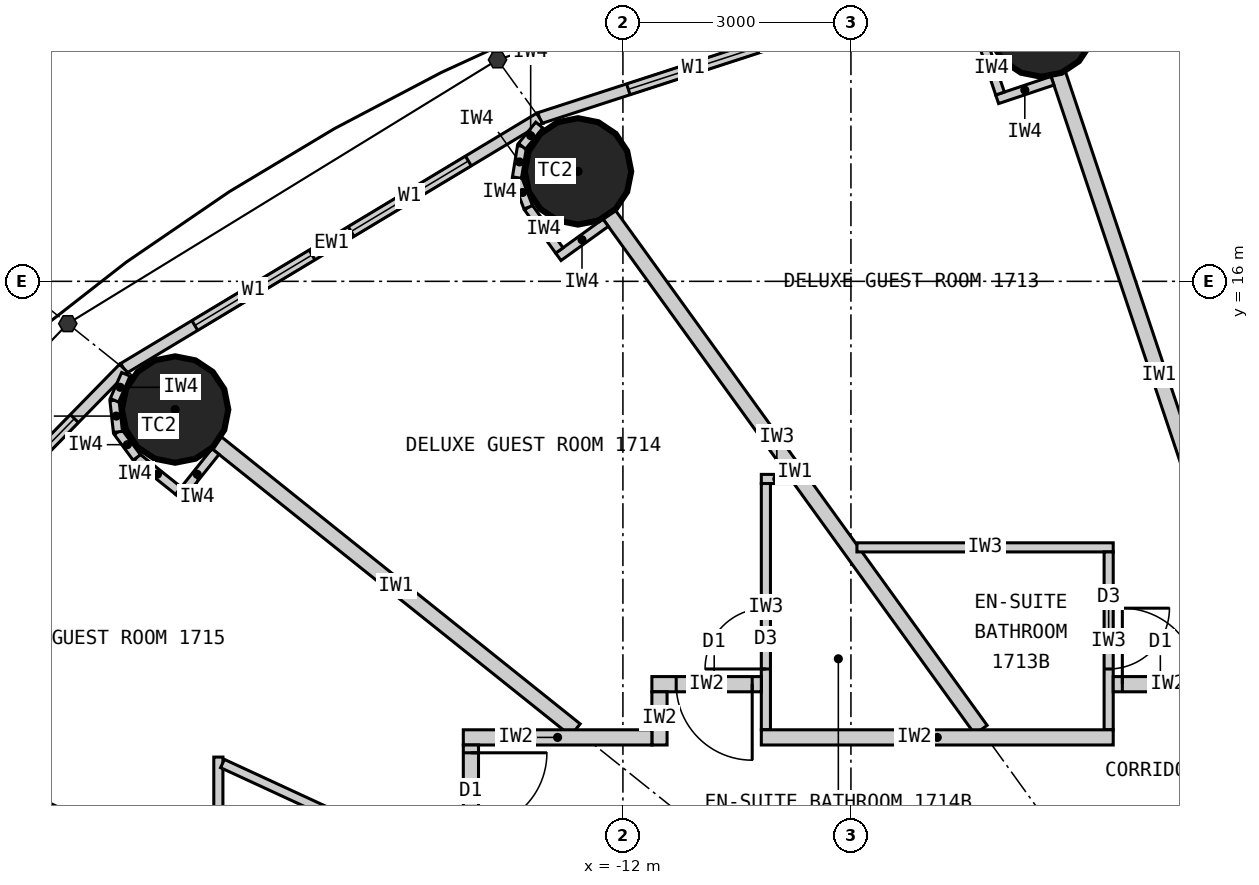
"""IFC4 building model, lengths in metres.
Left out: names, types, materials, properties, quantities, classifications, styles, units other than length and angle.
Written with IfcOpenShell. Run it as: python <this file> out.ifc"""

import sys

from ifc_helpers import new_model, si_unit, direction, frame, frame_2d, origin, origin_2d, place, context, subcontext, project, spatial, rectangle, circle, extrude, element, fill, save


model = new_model("IFC4")
c1 = context("Model", 3, precision=1e-05, world=origin(), true_north=direction((0.0, 1.0)))
c2 = subcontext(c1, "Body", "Model", "MODEL_VIEW")
j1 = project(units=[si_unit("LENGTHUNIT", "METRE"), si_unit("PLANEANGLEUNIT", "RADIAN")], contexts=[c1])
p1 = place(None, origin())
s1 = spatial("IfcSite", under=j1, at=p1, CompositionType="ELEMENT")
p2 = place(p1, origin())
s2 = spatial("IfcBuilding", under=s1, at=p2, CompositionType="ELEMENT")
p3 = place(p2, frame((0.0, 0.0, 70.5)))
s3 = spatial("IfcBuildingStorey", under=s2, at=p3, CompositionType="ELEMENT", Elevation=70.5)
for number, where, z_axis, x_axis in (
    (1, (-6.495, 19.391, 0.0), (0.0, 0.0, 1.0), (1.0, 0.0, 0.0)),
    (2, (-12.591, 17.447, 0.0), (0.0, 0.0, 1.0), (1.0, 0.0, 0.0)),
    (3, (-17.892, 14.313, 0.0), (0.0, 0.0, 1.0), (1.0, 0.0, 0.0)),
):
    element("IfcColumn", number, at=place(p3, frame(where, z_axis=z_axis, x_axis=x_axis)), inside=s3, PredefinedType="COLUMN", context=c2, shape_type="SweptSolid", body=[
        extrude(circle(Radius=0.7, at=origin_2d()), origin(), (0.0, 0.0, 1.0), 3.3),
    ])
p4 = place(p3, frame((-6.766, 20.202, 0.0), z_axis=(0.0, 0.0, 1.0), x_axis=(-0.951137534625, -0.308767534285, 0.0)))
e4 = element("IfcWall", 4, at=p4, inside=s3, PredefinedType="ELEMENTEDWALL", context=c2, shape_type="SweptSolid", body=[
    extrude(rectangle(XDim=6.655, YDim=0.15, at=frame_2d((3.328, 0.0))), origin(), (0.0, 0.0, 1.0), 3.12),
])
p5 = place(p4, frame((1.228, 0.0, 0.9)))
e5 = element("IfcOpeningElement", 5, at=p5, cuts=e4, PredefinedType="OPENING", context=c2, shape_type="SweptSolid", body=[
    extrude(rectangle(XDim=1.8, YDim=1.9, at=frame_2d((0.9, 0.95))), frame((0.0, 0.085, 0.0), z_axis=(0.0, -1.0, 0.0), x_axis=(1.0, 0.0, 0.0)), (0.0, 0.0, 1.0), 0.17),
])
p6 = place(p4, frame((3.628, 0.0, 0.9)))
e6 = element("IfcOpeningElement", 6, at=p6, cuts=e4, PredefinedType="OPENING", context=c2, shape_type="SweptSolid", body=[
    extrude(rectangle(XDim=1.8, YDim=1.9, at=frame_2d((0.9, 0.95))), frame((0.0, 0.085, 0.0), z_axis=(0.0, -1.0, 0.0), x_axis=(1.0, 0.0, 0.0)), (0.0, 0.0, 1.0), 0.17),
])
p7 = place(p3, frame((-13.096, 18.147, 0.0), z_axis=(0.0, 0.0, 1.0), x_axis=(-0.856983180864, -0.515344377787, 0.0)))
e7 = element("IfcWall", 7, at=p7, inside=s3, PredefinedType="ELEMENTEDWALL", context=c2, shape_type="SweptSolid", body=[
    extrude(rectangle(XDim=6.386, YDim=0.15, at=frame_2d((3.193, 0.0))), origin(), (0.0, 0.0, 1.0), 3.12),
])
p8 = place(p7, frame((1.093, 0.0, 0.9)))
e8 = element("IfcOpeningElement", 8, at=p8, cuts=e7, PredefinedType="OPENING", context=c2, shape_type="SweptSolid", body=[
    extrude(rectangle(XDim=1.8, YDim=1.9, at=frame_2d((0.9, 0.95))), frame((0.0, 0.085, 0.0), z_axis=(0.0, -1.0, 0.0), x_axis=(1.0, 0.0, 0.0)), (0.0, 0.0, 1.0), 0.17),
])
p9 = place(p7, frame((3.493, 0.0, 0.9)))
e9 = element("IfcOpeningElement", 9, at=p9, cuts=e7, PredefinedType="OPENING", context=c2, shape_type="SweptSolid", body=[
    extrude(rectangle(XDim=1.8, YDim=1.9, at=frame_2d((0.9, 0.95))), frame((0.0, 0.085, 0.0), z_axis=(0.0, -1.0, 0.0), x_axis=(1.0, 0.0, 0.0)), (0.0, 0.0, 1.0), 0.17),
])
p10 = place(p3, frame((-18.57, 14.856, 0.0), z_axis=(0.0, 0.0, 1.0), x_axis=(-0.699602905915, -0.714531856557, 0.0)))
e10 = element("IfcWall", 10, at=p10, inside=s3, PredefinedType="ELEMENTEDWALL", context=c2, shape_type="SweptSolid", body=[
    extrude(rectangle(XDim=6.051, YDim=0.15, at=frame_2d((3.025, 0.0))), origin(), (0.0, 0.0, 1.0), 3.12),
])
p11 = place(p10, frame((0.926, 0.0, 0.9)))
e11 = element("IfcOpeningElement", 11, at=p11, cuts=e10, PredefinedType="OPENING", context=c2, shape_type="SweptSolid", body=[
    extrude(rectangle(XDim=1.8, YDim=1.9, at=frame_2d((0.9, 0.95))), frame((0.0, 0.085, 0.0), z_axis=(0.0, -1.0, 0.0), x_axis=(1.0, 0.0, 0.0)), (0.0, 0.0, 1.0), 0.17),
])
p12 = place(p10, frame((3.325, 0.0, 0.9)))
e12 = element("IfcOpeningElement", 12, at=p12, cuts=e10, PredefinedType="OPENING", context=c2, shape_type="SweptSolid", body=[
    extrude(rectangle(XDim=1.8, YDim=1.9, at=frame_2d((0.9, 0.95))), frame((0.0, 0.085, 0.0), z_axis=(0.0, -1.0, 0.0), x_axis=(1.0, 0.0, 0.0)), (0.0, 0.0, 1.0), 0.17),
])
p13 = place(p3, frame((-3.617, 10.8, 0.0), z_axis=(0.0, 0.0, 1.0), x_axis=(-0.317576599239, 0.948232621046, 0.0)))
e13 = element("IfcWall", 13, at=p13, inside=s3, PredefinedType="PARTITIONING", context=c2, shape_type="SweptSolid", body=[
    extrude(rectangle(XDim=8.36, YDim=0.2, at=frame_2d((4.18, 0.0))), origin(), (0.0, 0.0, 1.0), 2.32),
])
p14 = place(p3, frame((-7.289, 10.1, 0.0), z_axis=(0.0, 0.0, 1.0), x_axis=(-0.585198353053, 0.810890182197, 0.0)))
e14 = element("IfcWall", 14, at=p14, inside=s3, PredefinedType="PARTITIONING", context=c2, shape_type="SweptSolid", body=[
    extrude(rectangle(XDim=8.36, YDim=0.2, at=frame_2d((4.18, 0.0))), origin(), (0.0, 0.0, 1.0), 2.32),
])
p15 = place(p3, frame((-12.625, 10.1, 0.0), z_axis=(0.0, 0.0, 1.0), x_axis=(-0.780892451574, 0.624665493744, 0.0)))
e15 = element("IfcWall", 15, at=p15, inside=s3, PredefinedType="PARTITIONING", context=c2, shape_type="SweptSolid", body=[
    extrude(rectangle(XDim=6.045, YDim=0.2, at=frame_2d((3.022, 0.0))), origin(), (0.0, 0.0, 1.0), 2.32),
])
p16 = place(p3, frame((-14.1, 6.512, 0.0), z_axis=(0.0, 0.0, 1.0), x_axis=(-0.907832871056, 0.419332181247, 0.0)))
e16 = element("IfcWall", 16, at=p16, inside=s3, PredefinedType="PARTITIONING", context=c2, shape_type="SweptSolid", body=[
    extrude(rectangle(XDim=8.023, YDim=0.2, at=frame_2d((4.011, 0.0))), origin(), (0.0, 0.0, 1.0), 2.32),
])
p17 = place(p3, frame((-8.921, 12.5, 0.0), z_axis=(0.0, 0.0, 1.0), x_axis=(1.0, 0.0, 0.0)))
e17 = element("IfcWall", 17, at=p17, inside=s3, PredefinedType="PARTITIONING", context=c2, shape_type="SweptSolid", body=[
    extrude(rectangle(XDim=3.372, YDim=0.12, at=frame_2d((1.686, 0.0))), origin(), (0.0, 0.0, 1.0), 3.12),
])
p18 = place(p3, frame((-5.609, 10.1, 0.0), z_axis=(0.0, 0.0, 1.0), x_axis=(0.0, 1.0, 0.0)))
e18 = element("IfcWall", 18, at=p18, inside=s3, PredefinedType="PARTITIONING", context=c2, shape_type="SweptSolid", body=[
    extrude(rectangle(XDim=2.34, YDim=0.12, at=frame_2d((1.17, 0.0))), origin(), (0.0, 0.0, 1.0), 3.12),
])
p19 = place(p18, frame((0.8, 0.0, 0.0)))
e19 = element("IfcOpeningElement", 19, at=p19, cuts=e18, PredefinedType="OPENING", context=c2, shape_type="SweptSolid", body=[
    extrude(rectangle(XDim=0.8, YDim=2.1, at=frame_2d((0.4, 1.05))), frame((0.0, 0.07, 0.0), z_axis=(0.0, -1.0, 0.0), x_axis=(1.0, 0.0, 0.0)), (0.0, 0.0, 1.0), 0.14),
])
p20 = place(p3, frame((-9.771, 13.4, 0.0), z_axis=(0.0, 0.0, 1.0), x_axis=(-1.0, 0.0, 0.0)))
e20 = element("IfcWall", 20, at=p20, inside=s3, PredefinedType="PARTITIONING", context=c2, shape_type="SweptSolid", body=[
    extrude(rectangle(XDim=0.408, YDim=0.12, at=frame_2d((0.204, 0.0))), origin(), (0.0, 0.0, 1.0), 3.12),
])
p21 = place(p3, frame((-10.119, 10.1, 0.0), z_axis=(0.0, 0.0, 1.0), x_axis=(0.0, 1.0, 0.0)))
e21 = element("IfcWall", 21, at=p21, inside=s3, PredefinedType="PARTITIONING", context=c2, shape_type="SweptSolid", body=[
    extrude(rectangle(XDim=3.24, YDim=0.12, at=frame_2d((1.62, 0.0))), origin(), (0.0, 0.0, 1.0), 3.12),
])
p22 = place(p21, frame((0.8, 0.0, 0.0)))
e22 = element("IfcOpeningElement", 22, at=p22, cuts=e21, PredefinedType="OPENING", context=c2, shape_type="SweptSolid", body=[
    extrude(rectangle(XDim=0.8, YDim=2.1, at=frame_2d((0.4, 1.05))), frame((0.0, 0.07, 0.0), z_axis=(0.0, -1.0, 0.0), x_axis=(1.0, 0.0, 0.0)), (0.0, 0.0, 1.0), 0.14),
])
p23 = place(p3, frame((-17.323, 8.101, 0.0), z_axis=(0.0, 0.0, 1.0), x_axis=(0.0, 1.0, 0.0)))
e23 = element("IfcWall", 23, at=p23, inside=s3, PredefinedType="PARTITIONING", context=c2, shape_type="SweptSolid", body=[
    extrude(rectangle(XDim=1.64, YDim=0.12, at=frame_2d((0.82, 0.0))), origin(), (0.0, 0.0, 1.0), 3.12),
])
p24 = place(p3, frame((-14.1, 8.193, 0.0), z_axis=(0.0, 0.0, 1.0), x_axis=(-0.907836493557, 0.419324338628, 0.0)))
e24 = element("IfcWall", 24, at=p24, inside=s3, PredefinedType="PARTITIONING", context=c2, shape_type="SweptSolid", body=[
    extrude(rectangle(XDim=3.49, YDim=0.12, at=frame_2d((1.745, 0.0))), origin(), (0.0, 0.0, 1.0), 3.12),
])
p25 = place(p24, frame((0.75, 0.0, 0.0)))
e25 = element("IfcOpeningElement", 25, at=p25, cuts=e24, PredefinedType="OPENING", context=c2, shape_type="SweptSolid", body=[
    extrude(rectangle(XDim=0.8, YDim=2.1, at=frame_2d((0.4, 1.05))), frame((0.0, 0.07, 0.0), z_axis=(0.0, -1.0, 0.0), x_axis=(1.0, 0.0, 0.0)), (0.0, 0.0, 1.0), 0.14),
])
p26 = place(p3, frame((-5.549, 10.7, 0.0), z_axis=(0.0, 0.0, 1.0), x_axis=(1.0, 0.0, 0.0)))
e26 = element("IfcWall", 26, at=p26, inside=s3, PredefinedType="PARTITIONING", context=c2, shape_type="SweptSolid", body=[
    extrude(rectangle(XDim=1.44, YDim=0.2, at=frame_2d((0.72, 0.0))), origin(), (0.0, 0.0, 1.0), 3.12),
])
p27 = place(p26, frame((0.12, 0.0, 0.0)))
e27 = element("IfcOpeningElement", 27, at=p27, cuts=e26, PredefinedType="OPENING", context=c2, shape_type="SweptSolid", body=[
    extrude(rectangle(XDim=1.0, YDim=2.2, at=frame_2d((0.5, 1.1))), frame((0.0, 0.11, 0.0), z_axis=(0.0, -1.0, 0.0), x_axis=(1.0, 0.0, 0.0)), (0.0, 0.0, 1.0), 0.22),
])
p28 = place(p3, frame((-11.619, 10.7, 0.0), z_axis=(0.0, 0.0, 1.0), x_axis=(1.0, 0.0, 0.0)))
e28 = element("IfcWall", 28, at=p28, inside=s3, PredefinedType="PARTITIONING", context=c2, shape_type="SweptSolid", body=[
    extrude(rectangle(XDim=1.44, YDim=0.2, at=frame_2d((0.72, 0.0))), origin(), (0.0, 0.0, 1.0), 3.12),
])
p29 = place(p28, frame((0.32, 0.0, 0.0)))
e29 = element("IfcOpeningElement", 29, at=p29, cuts=e28, PredefinedType="OPENING", context=c2, shape_type="SweptSolid", body=[
    extrude(rectangle(XDim=1.0, YDim=2.2, at=frame_2d((0.5, 1.1))), frame((0.0, 0.11, 0.0), z_axis=(0.0, -1.0, 0.0), x_axis=(1.0, 0.0, 0.0)), (0.0, 0.0, 1.0), 0.22),
])
p30 = place(p3, frame((-11.519, 9.9, 0.0), z_axis=(0.0, 0.0, 1.0), x_axis=(0.0, 1.0, 0.0)))
e30 = element("IfcWall", 30, at=p30, inside=s3, PredefinedType="PARTITIONING", context=c2, shape_type="SweptSolid", body=[
    extrude(rectangle(XDim=0.7, YDim=0.2, at=frame_2d((0.35, 0.0))), origin(), (0.0, 0.0, 1.0), 3.12),
])
p31 = place(p3, frame((-14.1, 10.0, 0.0), z_axis=(0.0, 0.0, 1.0), x_axis=(1.0, 0.0, 0.0)))
e31 = element("IfcWall", 31, at=p31, inside=s3, PredefinedType="PARTITIONING", context=c2, shape_type="SweptSolid", body=[
    extrude(rectangle(XDim=2.481, YDim=0.2, at=frame_2d((1.24, 0.0))), origin(), (0.0, 0.0, 1.0), 3.12),
])
p32 = place(p3, frame((-10.179, 10.0, 0.0), z_axis=(0.0, 0.0, 1.0), x_axis=(1.0, 0.0, 0.0)))
e32 = element("IfcWall", 32, at=p32, inside=s3, PredefinedType="PARTITIONING", context=c2, shape_type="SweptSolid", body=[
    extrude(rectangle(XDim=4.63, YDim=0.2, at=frame_2d((2.315, 0.0))), origin(), (0.0, 0.0, 1.0), 3.12),
])
p33 = place(p3, frame((-14.0, 9.9, 0.0), z_axis=(0.0, 0.0, 1.0), x_axis=(0.0, -1.0, 0.0)))
e33 = element("IfcWall", 33, at=p33, inside=s3, PredefinedType="PARTITIONING", context=c2, shape_type="SweptSolid", body=[
    extrude(rectangle(XDim=5.127, YDim=0.2, at=frame_2d((2.564, 0.0))), origin(), (0.0, 0.0, 1.0), 3.12),
])
p34 = place(p33, frame((0.103, 0.0, 0.0)))
e34 = element("IfcOpeningElement", 34, at=p34, cuts=e33, PredefinedType="OPENING", context=c2, shape_type="SweptSolid", body=[
    extrude(rectangle(XDim=1.0, YDim=2.2, at=frame_2d((0.5, 1.1))), frame((0.0, 0.11, 0.0), z_axis=(0.0, -1.0, 0.0), x_axis=(1.0, 0.0, 0.0)), (0.0, 0.0, 1.0), 0.22),
])
p35 = place(p3, frame((-6.348, 18.639, 0.0), z_axis=(0.0, 0.0, 1.0), x_axis=(-0.948268951266, -0.317468102437, 0.0)))
e35 = element("IfcWall", 35, at=p35, inside=s3, PredefinedType="PARTITIONING", context=c2, shape_type="SweptSolid", body=[
    extrude(rectangle(XDim=0.768, YDim=0.12, at=frame_2d((0.384, 0.0))), origin(), (0.0, 0.0, 1.0), 3.12),
])
p36 = place(p3, frame((-7.038, 18.471, 0.0), z_axis=(0.0, 0.0, 1.0), x_axis=(-0.317378466199, 0.9482989556, 0.0)))
e36 = element("IfcWall", 36, at=p36, inside=s3, PredefinedType="PARTITIONING", context=c2, shape_type="SweptSolid", body=[
    extrude(rectangle(XDim=0.7, YDim=0.12, at=frame_2d((0.35, 0.0))), origin(), (0.0, 0.0, 1.0), 3.12),
])
p37 = place(p3, frame((-12.227, 16.772, 0.0), z_axis=(0.0, 0.0, 1.0), x_axis=(-0.810821798253, -0.585293098778, 0.0)))
e37 = element("IfcWall", 37, at=p37, inside=s3, PredefinedType="PARTITIONING", context=c2, shape_type="SweptSolid", body=[
    extrude(rectangle(XDim=0.768, YDim=0.12, at=frame_2d((0.384, 0.0))), origin(), (0.0, 0.0, 1.0), 3.12),
])
p38 = place(p3, frame((-12.836, 16.406, 0.0), z_axis=(0.0, 0.0, 1.0), x_axis=(-0.585223113993, 0.810872312296, 0.0)))
e38 = element("IfcWall", 38, at=p38, inside=s3, PredefinedType="PARTITIONING", context=c2, shape_type="SweptSolid", body=[
    extrude(rectangle(XDim=0.7, YDim=0.12, at=frame_2d((0.35, 0.0))), origin(), (0.0, 0.0, 1.0), 3.12),
])
p39 = place(p3, frame((-13.246, 16.974, 0.0), z_axis=(0.0, 0.0, 1.0), x_axis=(-0.355728122235, 0.934589483705, 0.0)))
e39 = element("IfcWall", 39, at=p39, inside=s3, PredefinedType="PARTITIONING", context=c2, shape_type="SweptSolid", body=[
    extrude(rectangle(XDim=0.418, YDim=0.12, at=frame_2d((0.209, 0.0))), origin(), (0.0, 0.0, 1.0), 3.12),
])
p40 = place(p3, frame((-13.394, 17.365, 0.0), z_axis=(0.0, 0.0, 1.0), x_axis=(0.159379276926, 0.987217425943, 0.0)))
e40 = element("IfcWall", 40, at=p40, inside=s3, PredefinedType="PARTITIONING", context=c2, shape_type="SweptSolid", body=[
    extrude(rectangle(XDim=0.418, YDim=0.12, at=frame_2d((0.209, 0.0))), origin(), (0.0, 0.0, 1.0), 3.12),
])
p41 = place(p3, frame((-13.328, 17.777, 0.0), z_axis=(0.0, 0.0, 1.0), x_axis=(0.632276783541, 0.774742582407, 0.0)))
e41 = element("IfcWall", 41, at=p41, inside=s3, PredefinedType="PARTITIONING", context=c2, shape_type="SweptSolid", body=[
    extrude(rectangle(XDim=0.36, YDim=0.12, at=frame_2d((0.18, 0.0))), origin(), (0.0, 0.0, 1.0), 3.12),
])
p42 = place(p3, frame((-17.361, 13.76, 0.0), z_axis=(0.0, 0.0, 1.0), x_axis=(-0.624501042889, -0.781023973659, 0.0)))
e42 = element("IfcWall", 42, at=p42, inside=s3, PredefinedType="PARTITIONING", context=c2, shape_type="SweptSolid", body=[
    extrude(rectangle(XDim=0.767, YDim=0.12, at=frame_2d((0.384, 0.0))), origin(), (0.0, 0.0, 1.0), 3.12),
])
p43 = place(p3, frame((-17.85, 13.246, 0.0), z_axis=(0.0, 0.0, 1.0), x_axis=(-0.780902834923, 0.62465251333, 0.0)))
e43 = element("IfcWall", 43, at=p43, inside=s3, PredefinedType="PARTITIONING", context=c2, shape_type="SweptSolid", body=[
    extrude(rectangle(XDim=0.7, YDim=0.12, at=frame_2d((0.35, 0.0))), origin(), (0.0, 0.0, 1.0), 3.12),
])
for number, where, z_axis, x_axis in (
    (44, (-18.396, 13.683, 0.0), (0.0, 0.0, 1.0), (-0.592, 0.806, 0.0)),
    (45, (-18.644, 14.02, 0.0), (0.0, 0.0, 1.0), (-0.11, 0.994, 0.0)),
):
    element("IfcWall", number, at=place(p3, frame(where, z_axis=z_axis, x_axis=x_axis)), inside=s3, PredefinedType="PARTITIONING", context=c2, shape_type="SweptSolid", body=[
        extrude(rectangle(XDim=0.418, YDim=0.12, at=frame_2d((0.209, 0.0))), origin(), (0.0, 0.0, 1.0), 3.12),
    ])
p44 = place(p3, frame((-18.69, 14.435, 0.0), z_axis=(0.0, 0.0, 1.0), x_axis=(0.401093412634, 0.91603715773, 0.0)))
e46 = element("IfcWall", 46, at=p44, inside=s3, PredefinedType="PARTITIONING", context=c2, shape_type="SweptSolid", body=[
    extrude(rectangle(XDim=0.373, YDim=0.12, at=frame_2d((0.187, 0.0))), origin(), (0.0, 0.0, 1.0), 3.12),
])
p45 = place(p6, origin())
e47 = element("IfcWindow", 47, at=p45, inside=s3, PartitioningType="SINGLE_PANEL", PredefinedType="WINDOW", context=c2, shape_type="SweptSolid", body=[
    extrude(rectangle(XDim=1.8, YDim=1.9, at=frame_2d((0.9, 0.95))), frame((0.0, 0.03, 0.0), z_axis=(0.0, -1.0, 0.0), x_axis=(1.0, 0.0, 0.0)), (0.0, 0.0, 1.0), 0.06),
])
fill(e6, e47)
p46 = place(p8, origin())
e48 = element("IfcWindow", 48, at=p46, inside=s3, PartitioningType="SINGLE_PANEL", PredefinedType="WINDOW", context=c2, shape_type="SweptSolid", body=[
    extrude(rectangle(XDim=1.8, YDim=1.9, at=frame_2d((0.9, 0.95))), frame((0.0, 0.03, 0.0), z_axis=(0.0, -1.0, 0.0), x_axis=(1.0, 0.0, 0.0)), (0.0, 0.0, 1.0), 0.06),
])
fill(e8, e48)
p47 = place(p9, origin())
e49 = element("IfcWindow", 49, at=p47, inside=s3, PartitioningType="SINGLE_PANEL", PredefinedType="WINDOW", context=c2, shape_type="SweptSolid", body=[
    extrude(rectangle(XDim=1.8, YDim=1.9, at=frame_2d((0.9, 0.95))), frame((0.0, 0.03, 0.0), z_axis=(0.0, -1.0, 0.0), x_axis=(1.0, 0.0, 0.0)), (0.0, 0.0, 1.0), 0.06),
])
fill(e9, e49)
p48 = place(p11, origin())
e50 = element("IfcWindow", 50, at=p48, inside=s3, PartitioningType="SINGLE_PANEL", PredefinedType="WINDOW", context=c2, shape_type="SweptSolid", body=[
    extrude(rectangle(XDim=1.8, YDim=1.9, at=frame_2d((0.9, 0.95))), frame((0.0, 0.03, 0.0), z_axis=(0.0, -1.0, 0.0), x_axis=(1.0, 0.0, 0.0)), (0.0, 0.0, 1.0), 0.06),
])
fill(e11, e50)
p49 = place(p19, origin())
e51 = element("IfcDoor", 51, at=p49, inside=s3, OperationType="SINGLE_SWING_RIGHT", PredefinedType="DOOR", context=c2, shape_type="SweptSolid", body=[
    extrude(rectangle(XDim=0.8, YDim=2.1, at=frame_2d((0.4, 1.05))), frame((0.0, 0.025, 0.0), z_axis=(0.0, -1.0, 0.0), x_axis=(1.0, 0.0, 0.0)), (0.0, 0.0, 1.0), 0.05),
])
fill(e19, e51)
p50 = place(p27, origin())
e52 = element("IfcDoor", 52, at=p50, inside=s3, OperationType="SINGLE_SWING_LEFT", PredefinedType="DOOR", context=c2, shape_type="SweptSolid", body=[
    extrude(rectangle(XDim=1.0, YDim=2.2, at=frame_2d((0.5, 1.1))), frame((0.0, 0.025, 0.0), z_axis=(0.0, -1.0, 0.0), x_axis=(1.0, 0.0, 0.0)), (0.0, 0.0, 1.0), 0.05),
])
fill(e27, e52)
p51 = place(p22, origin())
e53 = element("IfcDoor", 53, at=p51, inside=s3, OperationType="SINGLE_SWING_LEFT", PredefinedType="DOOR", context=c2, shape_type="SweptSolid", body=[
    extrude(rectangle(XDim=0.8, YDim=2.1, at=frame_2d((0.4, 1.05))), frame((0.0, 0.025, 0.0), z_axis=(0.0, -1.0, 0.0), x_axis=(1.0, 0.0, 0.0)), (0.0, 0.0, 1.0), 0.05),
])
fill(e22, e53)
p52 = place(p29, origin())
e54 = element("IfcDoor", 54, at=p52, inside=s3, OperationType="SINGLE_SWING_RIGHT", PredefinedType="DOOR", context=c2, shape_type="SweptSolid", body=[
    extrude(rectangle(XDim=1.0, YDim=2.2, at=frame_2d((0.5, 1.1))), frame((0.0, 0.025, 0.0), z_axis=(0.0, -1.0, 0.0), x_axis=(1.0, 0.0, 0.0)), (0.0, 0.0, 1.0), 0.05),
])
fill(e29, e54)
p53 = place(p34, origin())
e55 = element("IfcDoor", 55, at=p53, inside=s3, OperationType="SINGLE_SWING_LEFT", PredefinedType="DOOR", context=c2, shape_type="SweptSolid", body=[
    extrude(rectangle(XDim=1.0, YDim=2.2, at=frame_2d((0.5, 1.1))), frame((0.0, 0.025, 0.0), z_axis=(0.0, -1.0, 0.0), x_axis=(1.0, 0.0, 0.0)), (0.0, 0.0, 1.0), 0.05),
])
fill(e34, e55)
save(model, sys.argv[1])
